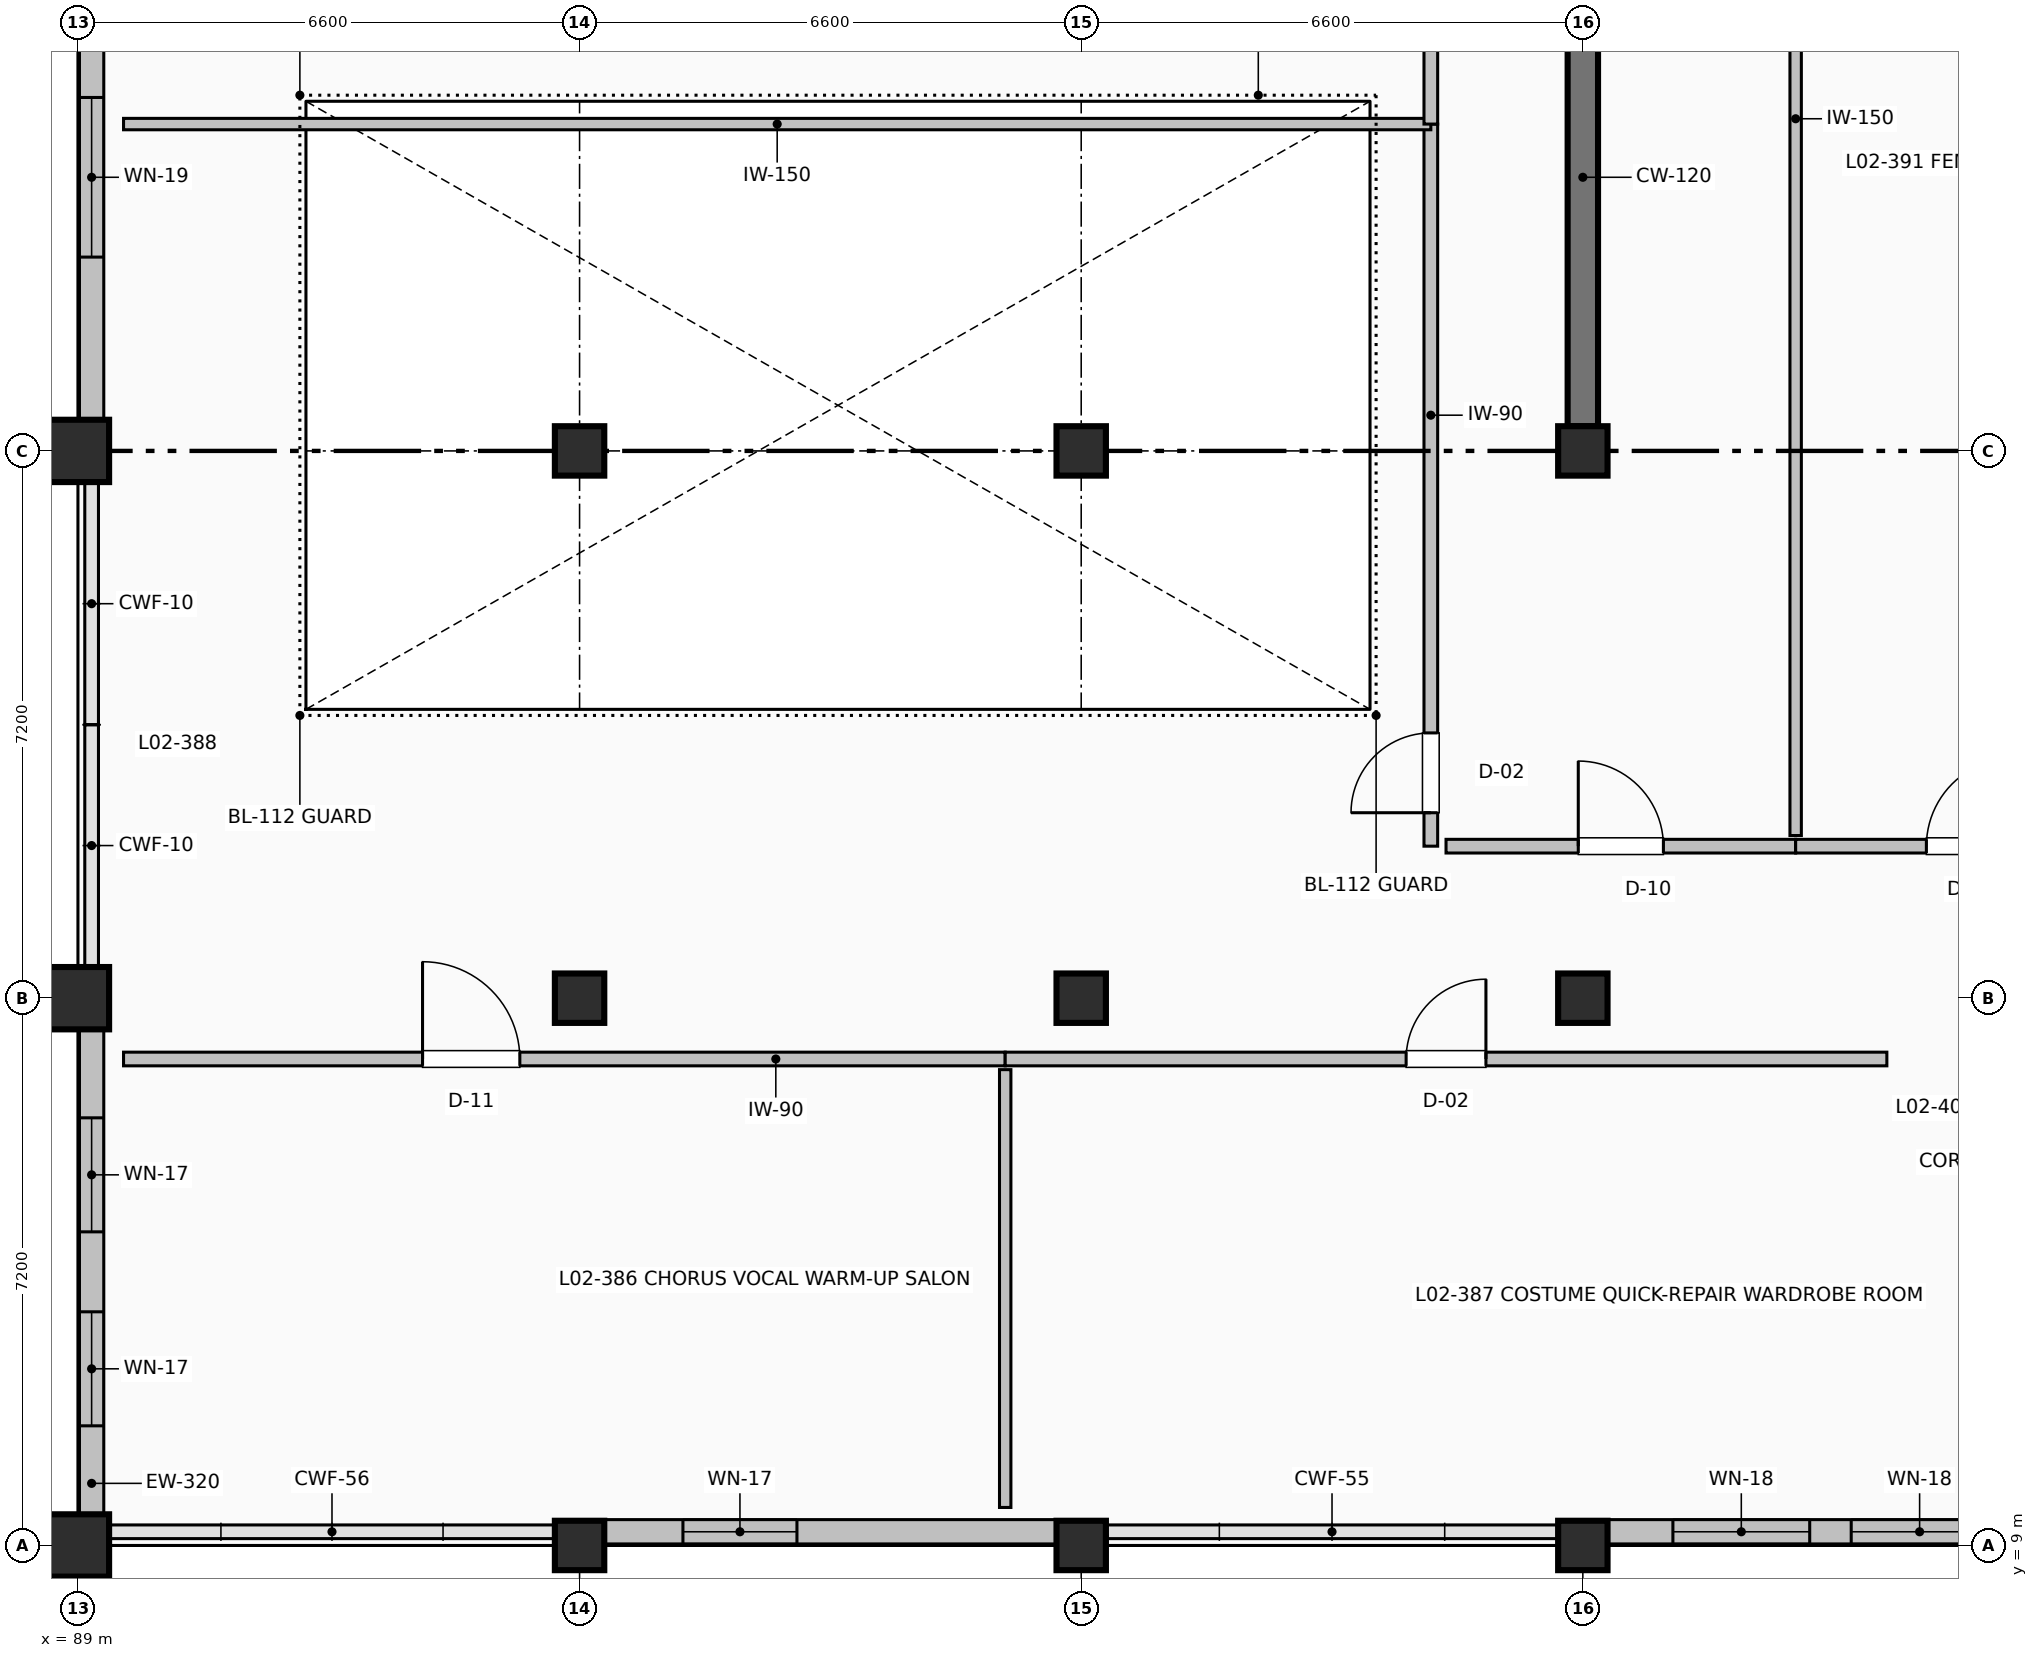
"""IFC4 building model, lengths in metres.
Left out: names, types, materials, properties, quantities, classifications, styles, units other than length and angle.
Written with IfcOpenShell. Run it as: python <this file> out.ifc"""

import sys

from ifc_helpers import new_model, si_unit, direction, frame, frame_2d, origin, origin_2d, place, context, subcontext, project, spatial, rectangle, extrude, element, fill, save


model = new_model("IFC4")
c1 = context("Model", 3, precision=1e-05, world=origin(), true_north=direction((0.0, 1.0)))
c2 = subcontext(c1, "Body", "Model", "MODEL_VIEW")
j1 = project(units=[si_unit("LENGTHUNIT", "METRE"), si_unit("PLANEANGLEUNIT", "RADIAN")], contexts=[c1])
p1 = place(None, origin())
s1 = spatial("IfcSite", under=j1, at=p1, CompositionType="ELEMENT")
p2 = place(p1, origin())
s2 = spatial("IfcBuilding", under=s1, at=p2, CompositionType="ELEMENT")
p3 = place(p2, frame((0.0, 0.0, 10.2)))
s3 = spatial("IfcBuildingStorey", under=s2, at=p3, CompositionType="ELEMENT", Elevation=10.2)
for number, where, z_axis, x_axis in (
    (1, (89.0, 9.0, 0.0), (0.0, 0.0, 1.0), (1.0, 0.0, 0.0)),
    (2, (89.0, 16.2, 0.0), (0.0, 0.0, 1.0), (1.0, 0.0, 0.0)),
    (3, (89.0, 23.4, 0.0), (0.0, 0.0, 1.0), (1.0, 0.0, 0.0)),
):
    element("IfcColumn", number, at=place(p3, frame(where, z_axis=z_axis, x_axis=x_axis)), inside=s3, PredefinedType="COLUMN", context=c2, shape_type="SweptSolid", body=[
        extrude(rectangle(XDim=0.82, YDim=0.82, at=origin_2d()), origin(), (0.0, 0.0, 1.0), 4.8),
    ])
for number, where, z_axis, x_axis in (
    (4, (95.6, 9.0, 0.0), (0.0, 0.0, 1.0), (1.0, 0.0, 0.0)),
    (5, (95.6, 16.2, 0.0), (0.0, 0.0, 1.0), (1.0, 0.0, 0.0)),
    (6, (95.6, 23.4, 0.0), (0.0, 0.0, 1.0), (1.0, 0.0, 0.0)),
    (7, (102.2, 9.0, 0.0), (0.0, 0.0, 1.0), (1.0, 0.0, 0.0)),
    (8, (102.2, 16.2, 0.0), (0.0, 0.0, 1.0), (1.0, 0.0, 0.0)),
    (9, (102.2, 23.4, 0.0), (0.0, 0.0, 1.0), (1.0, 0.0, 0.0)),
    (10, (108.8, 9.0, 0.0), (0.0, 0.0, 1.0), (1.0, 0.0, 0.0)),
    (11, (108.8, 16.2, 0.0), (0.0, 0.0, 1.0), (1.0, 0.0, 0.0)),
    (12, (108.8, 23.4, 0.0), (0.0, 0.0, 1.0), (1.0, 0.0, 0.0)),
):
    element("IfcColumn", number, at=place(p3, frame(where, z_axis=z_axis, x_axis=x_axis)), inside=s3, PredefinedType="COLUMN", context=c2, shape_type="SweptSolid", body=[
        extrude(rectangle(XDim=0.65, YDim=0.65, at=origin_2d()), origin(), (0.0, 0.0, 1.0), 4.8),
    ])
p4 = place(p3, frame((108.8, 23.725, 0.0), z_axis=(0.0, 0.0, 1.0), x_axis=(0.0, 1.0, 0.0)))
e13 = element("IfcWall", 13, at=p4, inside=s3, PredefinedType="SHEAR", context=c2, shape_type="SweptSolid", body=[
    extrude(rectangle(XDim=6.55, YDim=0.4, at=frame_2d((3.275, 0.0))), origin(), (0.0, 0.0, 1.0), 4.48),
])
p5 = place(p3, frame((89.18, 9.41, 0.0), z_axis=(0.0, 0.0, 1.0), x_axis=(0.0, 1.0, 0.0)))
e14 = element("IfcWall", 14, at=p5, inside=s3, PredefinedType="SOLIDWALL", context=c2, shape_type="SweptSolid", body=[
    extrude(rectangle(XDim=6.38, YDim=0.32, at=frame_2d((3.19, 0.0))), origin(), (0.0, 0.0, 1.0), 3.742),
])
p6 = place(p5, frame((1.164, 0.0, 1.0)))
e15 = element("IfcOpeningElement", 15, at=p6, cuts=e14, PredefinedType="OPENING", context=c2, shape_type="SweptSolid", body=[
    extrude(rectangle(XDim=1.5, YDim=1.7, at=frame_2d((0.75, 0.85))), frame((0.0, 0.17, 0.0), z_axis=(0.0, -1.0, 0.0), x_axis=(1.0, 0.0, 0.0)), (0.0, 0.0, 1.0), 0.34),
])
p7 = place(p5, frame((3.716, 0.0, 1.0)))
e16 = element("IfcOpeningElement", 16, at=p7, cuts=e14, PredefinedType="OPENING", context=c2, shape_type="SweptSolid", body=[
    extrude(rectangle(XDim=1.5, YDim=1.7, at=frame_2d((0.75, 0.85))), frame((0.0, 0.17, 0.0), z_axis=(0.0, -1.0, 0.0), x_axis=(1.0, 0.0, 0.0)), (0.0, 0.0, 1.0), 0.34),
])
p8 = place(p3, frame((89.18, 23.81, 0.0), z_axis=(0.0, 0.0, 1.0), x_axis=(0.0, 1.0, 0.0)))
e17 = element("IfcWall", 17, at=p8, inside=s3, PredefinedType="SOLIDWALL", context=c2, shape_type="SweptSolid", body=[
    extrude(rectangle(XDim=6.38, YDim=0.32, at=frame_2d((3.19, 0.0))), origin(), (0.0, 0.0, 1.0), 3.742),
])
p9 = place(p8, frame((2.14, 0.0, 1.0)))
e18 = element("IfcOpeningElement", 18, at=p9, cuts=e17, PredefinedType="OPENING", context=c2, shape_type="SweptSolid", body=[
    extrude(rectangle(XDim=2.1, YDim=1.7, at=frame_2d((1.05, 0.85))), frame((0.0, 0.17, 0.0), z_axis=(0.0, -1.0, 0.0), x_axis=(1.0, 0.0, 0.0)), (0.0, 0.0, 1.0), 0.34),
])
p10 = place(p3, frame((114.99, 9.18, 0.0), z_axis=(0.0, 0.0, 1.0), x_axis=(-1.0, 0.0, 0.0)))
e19 = element("IfcWall", 19, at=p10, inside=s3, PredefinedType="SOLIDWALL", context=c2, shape_type="SweptSolid", body=[
    extrude(rectangle(XDim=5.865, YDim=0.32, at=frame_2d((2.933, 0.0))), origin(), (0.0, 0.0, 1.0), 3.742),
])
p11 = place(p10, frame((0.859, 0.0, 1.0)))
e20 = element("IfcOpeningElement", 20, at=p11, cuts=e19, PredefinedType="OPENING", context=c2, shape_type="SweptSolid", body=[
    extrude(rectangle(XDim=1.8, YDim=1.7, at=frame_2d((0.9, 0.85))), frame((0.0, 0.17, 0.0), z_axis=(0.0, -1.0, 0.0), x_axis=(1.0, 0.0, 0.0)), (0.0, 0.0, 1.0), 0.34),
])
p12 = place(p10, frame((3.205, 0.0, 1.0)))
e21 = element("IfcOpeningElement", 21, at=p12, cuts=e19, PredefinedType="OPENING", context=c2, shape_type="SweptSolid", body=[
    extrude(rectangle(XDim=1.8, YDim=1.7, at=frame_2d((0.9, 0.85))), frame((0.0, 0.17, 0.0), z_axis=(0.0, -1.0, 0.0), x_axis=(1.0, 0.0, 0.0)), (0.0, 0.0, 1.0), 0.34),
])
p13 = place(p3, frame((101.875, 9.18, 0.0), z_axis=(0.0, 0.0, 1.0), x_axis=(-1.0, 0.0, 0.0)))
e22 = element("IfcWall", 22, at=p13, inside=s3, PredefinedType="SOLIDWALL", context=c2, shape_type="SweptSolid", body=[
    extrude(rectangle(XDim=5.95, YDim=0.32, at=frame_2d((2.975, 0.0))), origin(), (0.0, 0.0, 1.0), 3.742),
])
p14 = place(p13, frame((3.415, 0.0, 1.0)))
e23 = element("IfcOpeningElement", 23, at=p14, cuts=e22, PredefinedType="OPENING", context=c2, shape_type="SweptSolid", body=[
    extrude(rectangle(XDim=1.5, YDim=1.7, at=frame_2d((0.75, 0.85))), frame((0.0, 0.17, 0.0), z_axis=(0.0, -1.0, 0.0), x_axis=(1.0, 0.0, 0.0)), (0.0, 0.0, 1.0), 0.34),
])
p15 = place(p3, frame((89.6, 15.4, 0.0), z_axis=(0.0, 0.0, 1.0), x_axis=(1.0, 0.0, 0.0)))
e24 = element("IfcWall", 24, at=p15, inside=s3, PredefinedType="PARTITIONING", context=c2, shape_type="SweptSolid", body=[
    extrude(rectangle(XDim=11.6, YDim=0.18, at=frame_2d((5.8, 0.0))), origin(), (0.0, 0.0, 1.0), 4.492),
])
p16 = place(p15, frame((3.934, 0.0, 0.0)))
e25 = element("IfcOpeningElement", 25, at=p16, cuts=e24, PredefinedType="OPENING", context=c2, shape_type="SweptSolid", body=[
    extrude(rectangle(XDim=1.28, YDim=2.14, at=frame_2d((0.64, 1.07))), frame((0.0, 0.1, 0.0), z_axis=(0.0, -1.0, 0.0), x_axis=(1.0, 0.0, 0.0)), (0.0, 0.0, 1.0), 0.2),
])
p17 = place(p3, frame((101.2, 9.5, 0.0), z_axis=(0.0, 0.0, 1.0), x_axis=(0.0, 1.0, 0.0)))
e26 = element("IfcWall", 26, at=p17, inside=s3, PredefinedType="PARTITIONING", context=c2, shape_type="SweptSolid", body=[
    extrude(rectangle(XDim=5.76, YDim=0.15, at=frame_2d((2.88, 0.0))), origin(), (0.0, 0.0, 1.0), 4.492),
])
p18 = place(p3, frame((101.2, 15.4, 0.0), z_axis=(0.0, 0.0, 1.0), x_axis=(1.0, 0.0, 0.0)))
e27 = element("IfcWall", 27, at=p18, inside=s3, PredefinedType="PARTITIONING", context=c2, shape_type="SweptSolid", body=[
    extrude(rectangle(XDim=11.6, YDim=0.18, at=frame_2d((5.8, 0.0))), origin(), (0.0, 0.0, 1.0), 4.492),
])
p19 = place(p18, frame((5.275, 0.0, 0.0)))
e28 = element("IfcOpeningElement", 28, at=p19, cuts=e27, PredefinedType="OPENING", context=c2, shape_type="SweptSolid", body=[
    extrude(rectangle(XDim=1.05, YDim=2.1, at=frame_2d((0.525, 1.05))), frame((0.0, 0.1, 0.0), z_axis=(0.0, -1.0, 0.0), x_axis=(1.0, 0.0, 0.0)), (0.0, 0.0, 1.0), 0.2),
])
p20 = place(p3, frame((106.8, 18.2, 0.0), z_axis=(0.0, 0.0, 1.0), x_axis=(0.0, 1.0, 0.0)))
e29 = element("IfcWall", 29, at=p20, inside=s3, PredefinedType="PARTITIONING", context=c2, shape_type="SweptSolid", body=[
    extrude(rectangle(XDim=9.5, YDim=0.18, at=frame_2d((4.75, 0.0))), origin(), (0.0, 0.0, 1.0), 4.492),
])
p21 = place(p20, frame((0.44, 0.0, 0.0)))
e30 = element("IfcOpeningElement", 30, at=p21, cuts=e29, PredefinedType="OPENING", context=c2, shape_type="SweptSolid", body=[
    extrude(rectangle(XDim=1.05, YDim=2.1, at=frame_2d((0.525, 1.05))), frame((0.0, 0.1, 0.0), z_axis=(0.0, -1.0, 0.0), x_axis=(1.0, 0.0, 0.0)), (0.0, 0.0, 1.0), 0.2),
])
p22 = place(p3, frame((89.6, 27.7, 0.0), z_axis=(0.0, 0.0, 1.0), x_axis=(1.0, 0.0, 0.0)))
e31 = element("IfcWall", 31, at=p22, inside=s3, PredefinedType="PARTITIONING", context=c2, shape_type="SweptSolid", body=[
    extrude(rectangle(XDim=17.2, YDim=0.15, at=frame_2d((8.6, 0.0))), origin(), (0.0, 0.0, 1.0), 4.492),
])
p23 = place(p3, frame((106.8, 27.7, 0.0), z_axis=(0.0, 0.0, 1.0), x_axis=(0.0, 1.0, 0.0)))
e32 = element("IfcWall", 32, at=p23, inside=s3, PredefinedType="PARTITIONING", context=c2, shape_type="SweptSolid", body=[
    extrude(rectangle(XDim=9.5, YDim=0.18, at=frame_2d((4.75, 0.0))), origin(), (0.0, 0.0, 1.0), 4.492),
])
p24 = place(p23, frame((4.19, 0.0, 0.0)))
e33 = element("IfcOpeningElement", 33, at=p24, cuts=e32, PredefinedType="OPENING", context=c2, shape_type="SweptSolid", body=[
    extrude(rectangle(XDim=1.12, YDim=2.12, at=frame_2d((0.56, 1.06))), frame((0.0, 0.1, 0.0), z_axis=(0.0, -1.0, 0.0), x_axis=(1.0, 0.0, 0.0)), (0.0, 0.0, 1.0), 0.2),
])
p25 = place(p3, frame((107.0, 18.2, 0.0), z_axis=(0.0, 0.0, 1.0), x_axis=(1.0, 0.0, 0.0)))
e34 = element("IfcWall", 34, at=p25, inside=s3, PredefinedType="PARTITIONING", context=c2, shape_type="SweptSolid", body=[
    extrude(rectangle(XDim=4.6, YDim=0.18, at=frame_2d((2.3, 0.0))), origin(), (0.0, 0.0, 1.0), 4.492),
])
p26 = place(p25, frame((1.74, 0.0, 0.0)))
e35 = element("IfcOpeningElement", 35, at=p26, cuts=e34, PredefinedType="OPENING", context=c2, shape_type="SweptSolid", body=[
    extrude(rectangle(XDim=1.12, YDim=2.12, at=frame_2d((0.56, 1.06))), frame((0.0, 0.1, 0.0), z_axis=(0.0, -1.0, 0.0), x_axis=(1.0, 0.0, 0.0)), (0.0, 0.0, 1.0), 0.2),
])
p27 = place(p3, frame((111.6, 18.34, 0.0), z_axis=(0.0, 0.0, 1.0), x_axis=(0.0, 1.0, 0.0)))
e36 = element("IfcWall", 36, at=p27, inside=s3, PredefinedType="PARTITIONING", context=c2, shape_type="SweptSolid", body=[
    extrude(rectangle(XDim=18.86, YDim=0.15, at=frame_2d((9.43, 0.0))), origin(), (0.0, 0.0, 1.0), 4.492),
])
p28 = place(p3, frame((111.6, 18.2, 0.0), z_axis=(0.0, 0.0, 1.0), x_axis=(1.0, 0.0, 0.0)))
e37 = element("IfcWall", 37, at=p28, inside=s3, PredefinedType="PARTITIONING", context=c2, shape_type="SweptSolid", body=[
    extrude(rectangle(XDim=4.6, YDim=0.18, at=frame_2d((2.3, 0.0))), origin(), (0.0, 0.0, 1.0), 4.492),
])
p29 = place(p28, frame((1.72, 0.0, 0.0)))
e38 = element("IfcOpeningElement", 38, at=p29, cuts=e37, PredefinedType="OPENING", context=c2, shape_type="SweptSolid", body=[
    extrude(rectangle(XDim=1.16, YDim=2.1, at=frame_2d((0.58, 1.05))), frame((0.0, 0.1, 0.0), z_axis=(0.0, -1.0, 0.0), x_axis=(1.0, 0.0, 0.0)), (0.0, 0.0, 1.0), 0.2),
])
p30 = place(p6, origin())
e39 = element("IfcWindow", 39, at=p30, inside=s3, PartitioningType="SINGLE_PANEL", PredefinedType="WINDOW", context=c2, shape_type="SweptSolid", body=[
    extrude(rectangle(XDim=1.5, YDim=1.7, at=frame_2d((0.75, 0.85))), frame((0.0, 0.03, 0.0), z_axis=(0.0, -1.0, 0.0), x_axis=(1.0, 0.0, 0.0)), (0.0, 0.0, 1.0), 0.06),
])
fill(e15, e39)
p31 = place(p7, origin())
e40 = element("IfcWindow", 40, at=p31, inside=s3, PartitioningType="SINGLE_PANEL", PredefinedType="WINDOW", context=c2, shape_type="SweptSolid", body=[
    extrude(rectangle(XDim=1.5, YDim=1.7, at=frame_2d((0.75, 0.85))), frame((0.0, 0.03, 0.0), z_axis=(0.0, -1.0, 0.0), x_axis=(1.0, 0.0, 0.0)), (0.0, 0.0, 1.0), 0.06),
])
fill(e16, e40)
p32 = place(p9, origin())
e41 = element("IfcWindow", 41, at=p32, inside=s3, PartitioningType="SINGLE_PANEL", PredefinedType="WINDOW", context=c2, shape_type="SweptSolid", body=[
    extrude(rectangle(XDim=2.1, YDim=1.7, at=frame_2d((1.05, 0.85))), frame((0.0, 0.03, 0.0), z_axis=(0.0, -1.0, 0.0), x_axis=(1.0, 0.0, 0.0)), (0.0, 0.0, 1.0), 0.06),
])
fill(e18, e41)
p33 = place(p11, origin())
e42 = element("IfcWindow", 42, at=p33, inside=s3, PartitioningType="SINGLE_PANEL", PredefinedType="WINDOW", context=c2, shape_type="SweptSolid", body=[
    extrude(rectangle(XDim=1.8, YDim=1.7, at=frame_2d((0.9, 0.85))), frame((0.0, 0.03, 0.0), z_axis=(0.0, -1.0, 0.0), x_axis=(1.0, 0.0, 0.0)), (0.0, 0.0, 1.0), 0.06),
])
fill(e20, e42)
p34 = place(p12, origin())
e43 = element("IfcWindow", 43, at=p34, inside=s3, PartitioningType="SINGLE_PANEL", PredefinedType="WINDOW", context=c2, shape_type="SweptSolid", body=[
    extrude(rectangle(XDim=1.8, YDim=1.7, at=frame_2d((0.9, 0.85))), frame((0.0, 0.03, 0.0), z_axis=(0.0, -1.0, 0.0), x_axis=(1.0, 0.0, 0.0)), (0.0, 0.0, 1.0), 0.06),
])
fill(e21, e43)
p35 = place(p14, origin())
e44 = element("IfcWindow", 44, at=p35, inside=s3, PartitioningType="SINGLE_PANEL", PredefinedType="WINDOW", context=c2, shape_type="SweptSolid", body=[
    extrude(rectangle(XDim=1.5, YDim=1.7, at=frame_2d((0.75, 0.85))), frame((0.0, 0.03, 0.0), z_axis=(0.0, -1.0, 0.0), x_axis=(1.0, 0.0, 0.0)), (0.0, 0.0, 1.0), 0.06),
])
fill(e23, e44)
p36 = place(p16, origin())
e45 = element("IfcDoor", 45, at=p36, inside=s3, OperationType="SINGLE_SWING_LEFT", PredefinedType="DOOR", context=c2, shape_type="SweptSolid", body=[
    extrude(rectangle(XDim=1.28, YDim=2.14, at=frame_2d((0.64, 1.07))), frame((0.0, 0.025, 0.0), z_axis=(0.0, -1.0, 0.0), x_axis=(1.0, 0.0, 0.0)), (0.0, 0.0, 1.0), 0.05),
])
fill(e25, e45)
p37 = place(p19, origin())
e46 = element("IfcDoor", 46, at=p37, inside=s3, OperationType="SINGLE_SWING_RIGHT", PredefinedType="DOOR", context=c2, shape_type="SweptSolid", body=[
    extrude(rectangle(XDim=1.05, YDim=2.1, at=frame_2d((0.525, 1.05))), frame((0.0, 0.025, 0.0), z_axis=(0.0, -1.0, 0.0), x_axis=(1.0, 0.0, 0.0)), (0.0, 0.0, 1.0), 0.05),
])
fill(e28, e46)
p38 = place(p21, origin())
e47 = element("IfcDoor", 47, at=p38, inside=s3, OperationType="SINGLE_SWING_LEFT", PredefinedType="DOOR", context=c2, shape_type="SweptSolid", body=[
    extrude(rectangle(XDim=1.05, YDim=2.1, at=frame_2d((0.525, 1.05))), frame((0.0, 0.025, 0.0), z_axis=(0.0, -1.0, 0.0), x_axis=(1.0, 0.0, 0.0)), (0.0, 0.0, 1.0), 0.05),
])
fill(e30, e47)
p39 = place(p26, origin())
e48 = element("IfcDoor", 48, at=p39, inside=s3, OperationType="SINGLE_SWING_LEFT", PredefinedType="DOOR", context=c2, shape_type="SweptSolid", body=[
    extrude(rectangle(XDim=1.12, YDim=2.12, at=frame_2d((0.56, 1.06))), frame((0.0, 0.025, 0.0), z_axis=(0.0, -1.0, 0.0), x_axis=(1.0, 0.0, 0.0)), (0.0, 0.0, 1.0), 0.05),
])
fill(e35, e48)
p40 = place(p29, origin())
e49 = element("IfcDoor", 49, at=p40, inside=s3, OperationType="SINGLE_SWING_RIGHT", PredefinedType="DOOR", context=c2, shape_type="SweptSolid", body=[
    extrude(rectangle(XDim=1.16, YDim=2.1, at=frame_2d((0.58, 1.05))), frame((0.0, 0.025, 0.0), z_axis=(0.0, -1.0, 0.0), x_axis=(1.0, 0.0, 0.0)), (0.0, 0.0, 1.0), 0.05),
])
fill(e38, e49)
save(model, sys.argv[1])
